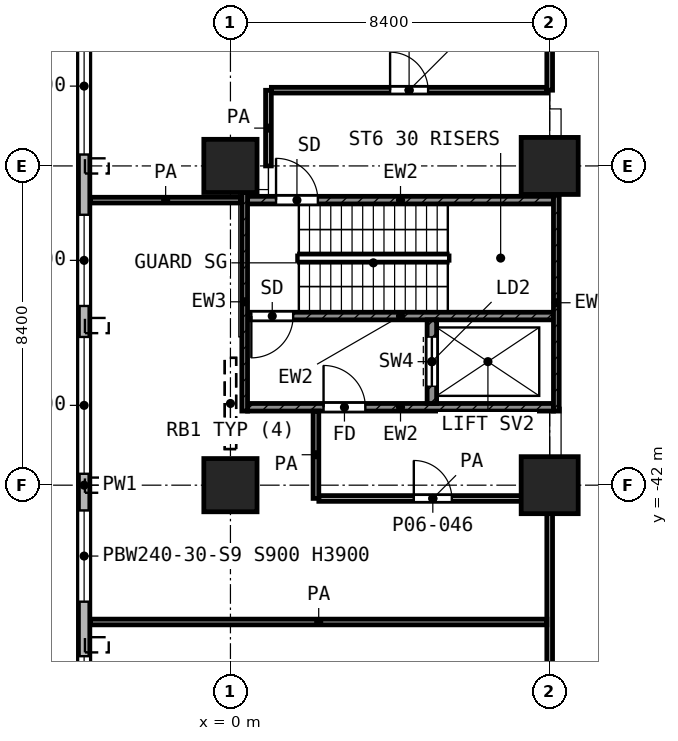
"""IFC4 building model, lengths in metres.
Left out: names, types, materials, properties, quantities, classifications, styles, units other than length and angle.
Written with IfcOpenShell. Run it as: python <this file> out.ifc"""

import sys

from ifc_helpers import new_model, si_unit, direction, frame, frame_2d, origin, origin_2d, place, context, subcontext, project, spatial, rectangle, extrude, element, fill, save


model = new_model("IFC4")
c1 = context("Model", 3, precision=1e-05, world=origin(), true_north=direction((0.0, 1.0)))
c2 = subcontext(c1, "Body", "Model", "MODEL_VIEW")
j1 = project(units=[si_unit("LENGTHUNIT", "METRE"), si_unit("PLANEANGLEUNIT", "RADIAN")], contexts=[c1])
p1 = place(None, origin())
s1 = spatial("IfcSite", under=j1, at=p1, CompositionType="ELEMENT")
p2 = place(p1, origin())
s2 = spatial("IfcBuilding", under=s1, at=p2, CompositionType="ELEMENT")
p3 = place(p2, frame((0.0, 0.0, 29.0)))
s3 = spatial("IfcBuildingStorey", under=s2, at=p3, CompositionType="ELEMENT", Elevation=29.0)
p4 = place(p3, frame((0.0, -33.6, 0.0), z_axis=(0.0, 0.0, 1.0), x_axis=(1.0, 0.0, 0.0)))
e1 = element("IfcColumn", 1, at=p4, inside=s3, PredefinedType="COLUMN", context=c2, shape_type="SweptSolid", body=[
    extrude(rectangle(XDim=1.4, YDim=1.4, at=origin_2d()), origin(), (0.0, 0.0, 1.0), 5.2),
])
p5 = place(p3, frame((8.4, -33.6, 0.0), z_axis=(0.0, 0.0, 1.0), x_axis=(1.0, 0.0, 0.0)))
e2 = element("IfcColumn", 2, at=p5, inside=s3, PredefinedType="COLUMN", context=c2, shape_type="SweptSolid", body=[
    extrude(rectangle(XDim=1.5, YDim=1.5, at=origin_2d()), origin(), (0.0, 0.0, 1.0), 5.2),
])
p6 = place(p3, frame((0.0, -42.0, 0.0), z_axis=(0.0, 0.0, 1.0), x_axis=(1.0, 0.0, 0.0)))
e3 = element("IfcColumn", 3, at=p6, inside=s3, PredefinedType="COLUMN", context=c2, shape_type="SweptSolid", body=[
    extrude(rectangle(XDim=1.4, YDim=1.4, at=origin_2d()), origin(), (0.0, 0.0, 1.0), 5.2),
])
p7 = place(p3, frame((8.4, -42.0, 0.0), z_axis=(0.0, 0.0, 1.0), x_axis=(1.0, 0.0, 0.0)))
e4 = element("IfcColumn", 4, at=p7, inside=s3, PredefinedType="COLUMN", context=c2, shape_type="SweptSolid", body=[
    extrude(rectangle(XDim=1.5, YDim=1.5, at=origin_2d()), origin(), (0.0, 0.0, 1.0), 5.2),
])
p8 = place(p3, frame((-3.85, -2.062, 0.0), z_axis=(0.0, 0.0, 1.0), x_axis=(0.0, -1.0, 0.0)))
e5 = element("IfcWall", 5, at=p8, inside=s3, PredefinedType="SOLIDWALL", context=c2, shape_type="SweptSolid", body=[
    extrude(rectangle(XDim=79.876, YDim=0.3, at=frame_2d((39.938, 0.0))), origin(), (0.0, 0.0, 1.0), 4.7),
])
p9 = place(p8, frame((0.438, 0.0, 0.9)))
e6 = element("IfcOpeningElement", 6, at=p9, cuts=e5, PredefinedType="OPENING", context=c2, shape_type="SweptSolid", body=[
    extrude(rectangle(XDim=1.2, YDim=3.0, at=frame_2d((0.6, 1.5))), frame((0.0, 0.16, 0.0), z_axis=(0.0, -1.0, 0.0), x_axis=(1.0, 0.0, 0.0)), (0.0, 0.0, 1.0), 0.32),
])
p10 = place(p8, frame((2.438, 0.0, 0.9)))
e7 = element("IfcOpeningElement", 7, at=p10, cuts=e5, PredefinedType="OPENING", context=c2, shape_type="SweptSolid", body=[
    extrude(rectangle(XDim=3.6, YDim=3.0, at=frame_2d((1.8, 1.5))), frame((0.0, 0.16, 0.0), z_axis=(0.0, -1.0, 0.0), x_axis=(1.0, 0.0, 0.0)), (0.0, 0.0, 1.0), 0.32),
])
p11 = place(p8, frame((6.638, 0.0, 0.9)))
e8 = element("IfcOpeningElement", 8, at=p11, cuts=e5, PredefinedType="OPENING", context=c2, shape_type="SweptSolid", body=[
    extrude(rectangle(XDim=3.6, YDim=3.0, at=frame_2d((1.8, 1.5))), frame((0.0, 0.16, 0.0), z_axis=(0.0, -1.0, 0.0), x_axis=(1.0, 0.0, 0.0)), (0.0, 0.0, 1.0), 0.32),
])
p12 = place(p8, frame((10.838, 0.0, 0.9)))
e9 = element("IfcOpeningElement", 9, at=p12, cuts=e5, PredefinedType="OPENING", context=c2, shape_type="SweptSolid", body=[
    extrude(rectangle(XDim=3.6, YDim=3.0, at=frame_2d((1.8, 1.5))), frame((0.0, 0.16, 0.0), z_axis=(0.0, -1.0, 0.0), x_axis=(1.0, 0.0, 0.0)), (0.0, 0.0, 1.0), 0.32),
])
p13 = place(p8, frame((15.038, 0.0, 0.9)))
e10 = element("IfcOpeningElement", 10, at=p13, cuts=e5, PredefinedType="OPENING", context=c2, shape_type="SweptSolid", body=[
    extrude(rectangle(XDim=3.6, YDim=3.0, at=frame_2d((1.8, 1.5))), frame((0.0, 0.16, 0.0), z_axis=(0.0, -1.0, 0.0), x_axis=(1.0, 0.0, 0.0)), (0.0, 0.0, 1.0), 0.32),
])
p14 = place(p8, frame((19.238, 0.0, 0.9)))
e11 = element("IfcOpeningElement", 11, at=p14, cuts=e5, PredefinedType="OPENING", context=c2, shape_type="SweptSolid", body=[
    extrude(rectangle(XDim=3.6, YDim=3.0, at=frame_2d((1.8, 1.5))), frame((0.0, 0.16, 0.0), z_axis=(0.0, -1.0, 0.0), x_axis=(1.0, 0.0, 0.0)), (0.0, 0.0, 1.0), 0.32),
])
p15 = place(p8, frame((24.323, 0.0, 0.9)))
e12 = element("IfcOpeningElement", 12, at=p15, cuts=e5, PredefinedType="OPENING", context=c2, shape_type="SweptSolid", body=[
    extrude(rectangle(XDim=2.4, YDim=3.0, at=frame_2d((1.2, 1.5))), frame((0.0, 0.16, 0.0), z_axis=(0.0, -1.0, 0.0), x_axis=(1.0, 0.0, 0.0)), (0.0, 0.0, 1.0), 0.32),
])
p16 = place(p8, frame((27.638, 0.0, 0.9)))
e13 = element("IfcOpeningElement", 13, at=p16, cuts=e5, PredefinedType="OPENING", context=c2, shape_type="SweptSolid", body=[
    extrude(rectangle(XDim=3.6, YDim=3.0, at=frame_2d((1.8, 1.5))), frame((0.0, 0.16, 0.0), z_axis=(0.0, -1.0, 0.0), x_axis=(1.0, 0.0, 0.0)), (0.0, 0.0, 1.0), 0.32),
])
p17 = place(p8, frame((32.823, 0.0, 0.9)))
e14 = element("IfcOpeningElement", 14, at=p17, cuts=e5, PredefinedType="OPENING", context=c2, shape_type="SweptSolid", body=[
    extrude(rectangle(XDim=2.4, YDim=3.0, at=frame_2d((1.2, 1.5))), frame((0.0, 0.16, 0.0), z_axis=(0.0, -1.0, 0.0), x_axis=(1.0, 0.0, 0.0)), (0.0, 0.0, 1.0), 0.32),
])
p18 = place(p8, frame((36.038, 0.0, 0.9)))
e15 = element("IfcOpeningElement", 15, at=p18, cuts=e5, PredefinedType="OPENING", context=c2, shape_type="SweptSolid", body=[
    extrude(rectangle(XDim=3.6, YDim=3.0, at=frame_2d((1.8, 1.5))), frame((0.0, 0.16, 0.0), z_axis=(0.0, -1.0, 0.0), x_axis=(1.0, 0.0, 0.0)), (0.0, 0.0, 1.0), 0.32),
])
p19 = place(p8, frame((40.603, 0.0, 0.9)))
e16 = element("IfcOpeningElement", 16, at=p19, cuts=e5, PredefinedType="OPENING", context=c2, shape_type="SweptSolid", body=[
    extrude(rectangle(XDim=2.4, YDim=3.0, at=frame_2d((1.2, 1.5))), frame((0.0, 0.16, 0.0), z_axis=(0.0, -1.0, 0.0), x_axis=(1.0, 0.0, 0.0)), (0.0, 0.0, 1.0), 0.32),
])
p20 = place(p8, frame((44.438, 0.0, 0.9)))
e17 = element("IfcOpeningElement", 17, at=p20, cuts=e5, PredefinedType="OPENING", context=c2, shape_type="SweptSolid", body=[
    extrude(rectangle(XDim=3.6, YDim=3.0, at=frame_2d((1.8, 1.5))), frame((0.0, 0.16, 0.0), z_axis=(0.0, -1.0, 0.0), x_axis=(1.0, 0.0, 0.0)), (0.0, 0.0, 1.0), 0.32),
])
p21 = place(p8, frame((48.638, 0.0, 0.9)))
e18 = element("IfcOpeningElement", 18, at=p21, cuts=e5, PredefinedType="OPENING", context=c2, shape_type="SweptSolid", body=[
    extrude(rectangle(XDim=3.6, YDim=3.0, at=frame_2d((1.8, 1.5))), frame((0.0, 0.16, 0.0), z_axis=(0.0, -1.0, 0.0), x_axis=(1.0, 0.0, 0.0)), (0.0, 0.0, 1.0), 0.32),
])
p22 = place(p8, frame((52.838, 0.0, 0.9)))
e19 = element("IfcOpeningElement", 19, at=p22, cuts=e5, PredefinedType="OPENING", context=c2, shape_type="SweptSolid", body=[
    extrude(rectangle(XDim=3.6, YDim=3.0, at=frame_2d((1.8, 1.5))), frame((0.0, 0.16, 0.0), z_axis=(0.0, -1.0, 0.0), x_axis=(1.0, 0.0, 0.0)), (0.0, 0.0, 1.0), 0.32),
])
p23 = place(p8, frame((57.038, 0.0, 0.9)))
e20 = element("IfcOpeningElement", 20, at=p23, cuts=e5, PredefinedType="OPENING", context=c2, shape_type="SweptSolid", body=[
    extrude(rectangle(XDim=3.6, YDim=3.0, at=frame_2d((1.8, 1.5))), frame((0.0, 0.16, 0.0), z_axis=(0.0, -1.0, 0.0), x_axis=(1.0, 0.0, 0.0)), (0.0, 0.0, 1.0), 0.32),
])
p24 = place(p8, frame((62.073, 0.0, 0.9)))
e21 = element("IfcOpeningElement", 21, at=p24, cuts=e5, PredefinedType="OPENING", context=c2, shape_type="SweptSolid", body=[
    extrude(rectangle(XDim=2.4, YDim=3.0, at=frame_2d((1.2, 1.5))), frame((0.0, 0.16, 0.0), z_axis=(0.0, -1.0, 0.0), x_axis=(1.0, 0.0, 0.0)), (0.0, 0.0, 1.0), 0.32),
])
p25 = place(p8, frame((65.438, 0.0, 0.9)))
e22 = element("IfcOpeningElement", 22, at=p25, cuts=e5, PredefinedType="OPENING", context=c2, shape_type="SweptSolid", body=[
    extrude(rectangle(XDim=3.6, YDim=3.0, at=frame_2d((1.8, 1.5))), frame((0.0, 0.16, 0.0), z_axis=(0.0, -1.0, 0.0), x_axis=(1.0, 0.0, 0.0)), (0.0, 0.0, 1.0), 0.32),
])
p26 = place(p8, frame((70.038, 0.0, 0.9)))
e23 = element("IfcOpeningElement", 23, at=p26, cuts=e5, PredefinedType="OPENING", context=c2, shape_type="SweptSolid", body=[
    extrude(rectangle(XDim=1.2, YDim=3.0, at=frame_2d((0.6, 1.5))), frame((0.0, 0.16, 0.0), z_axis=(0.0, -1.0, 0.0), x_axis=(1.0, 0.0, 0.0)), (0.0, 0.0, 1.0), 0.32),
])
p27 = place(p8, frame((73.838, 0.0, 0.9)))
e24 = element("IfcOpeningElement", 24, at=p27, cuts=e5, PredefinedType="OPENING", context=c2, shape_type="SweptSolid", body=[
    extrude(rectangle(XDim=3.6, YDim=3.0, at=frame_2d((1.8, 1.5))), frame((0.0, 0.16, 0.0), z_axis=(0.0, -1.0, 0.0), x_axis=(1.0, 0.0, 0.0)), (0.0, 0.0, 1.0), 0.32),
])
p28 = place(p8, frame((78.323, 0.0, 0.9)))
e25 = element("IfcOpeningElement", 25, at=p28, cuts=e5, PredefinedType="OPENING", context=c2, shape_type="SweptSolid", body=[
    extrude(rectangle(XDim=1.2, YDim=3.0, at=frame_2d((0.6, 1.5))), frame((0.0, 0.16, 0.0), z_axis=(0.0, -1.0, 0.0), x_axis=(1.0, 0.0, 0.0)), (0.0, 0.0, 1.0), 0.32),
])
p29 = place(p3, frame((0.375, -40.05, 0.0), z_axis=(0.0, 0.0, 1.0), x_axis=(0.0, 1.0, 0.0)))
e26 = element("IfcWall", 26, at=p29, inside=s3, PredefinedType="SHEAR", context=c2, shape_type="SweptSolid", body=[
    extrude(rectangle(XDim=5.75, YDim=0.15, at=frame_2d((2.875, 0.0))), origin(), (0.0, 0.0, 1.0), 4.7),
])
p30 = place(p3, frame((8.575, -40.05, 0.0), z_axis=(0.0, 0.0, 1.0), x_axis=(0.0, 1.0, 0.0)))
e27 = element("IfcWall", 27, at=p30, inside=s3, PredefinedType="SHEAR", context=c2, shape_type="SweptSolid", body=[
    extrude(rectangle(XDim=5.7, YDim=0.15, at=frame_2d((2.85, 0.0))), origin(), (0.0, 0.0, 1.0), 4.7),
])
p31 = place(p3, frame((0.45, -34.5, 0.0), z_axis=(0.0, 0.0, 1.0), x_axis=(1.0, 0.0, 0.0)))
e28 = element("IfcWall", 28, at=p31, inside=s3, PredefinedType="SHEAR", context=c2, shape_type="SweptSolid", body=[
    extrude(rectangle(XDim=8.05, YDim=0.2, at=frame_2d((4.025, 0.0))), origin(), (0.0, 0.0, 1.0), 4.7),
])
p32 = place(p31, frame((0.75, 0.0, 0.0)))
e29 = element("IfcOpeningElement", 29, at=p32, cuts=e28, PredefinedType="OPENING", context=c2, shape_type="SweptSolid", body=[
    extrude(rectangle(XDim=1.1, YDim=2.1, at=frame_2d((0.55, 1.05))), frame((0.0, 0.11, 0.0), z_axis=(0.0, -1.0, 0.0), x_axis=(1.0, 0.0, 0.0)), (0.0, 0.0, 1.0), 0.22),
])
p33 = place(p3, frame((0.45, -37.55, 0.0), z_axis=(0.0, 0.0, 1.0), x_axis=(1.0, 0.0, 0.0)))
e30 = element("IfcWall", 30, at=p33, inside=s3, PredefinedType="SHEAR", context=c2, shape_type="SweptSolid", body=[
    extrude(rectangle(XDim=8.05, YDim=0.2, at=frame_2d((4.025, 0.0))), origin(), (0.0, 0.0, 1.0), 4.7),
])
p34 = place(p33, frame((0.1, 0.0, 0.0)))
e31 = element("IfcOpeningElement", 31, at=p34, cuts=e30, PredefinedType="OPENING", context=c2, shape_type="SweptSolid", body=[
    extrude(rectangle(XDim=1.1, YDim=2.1, at=frame_2d((0.55, 1.05))), frame((0.0, 0.11, 0.0), z_axis=(0.0, -1.0, 0.0), x_axis=(1.0, 0.0, 0.0)), (0.0, 0.0, 1.0), 0.22),
])
p35 = place(p3, frame((0.45, -39.95, 0.0), z_axis=(0.0, 0.0, 1.0), x_axis=(1.0, 0.0, 0.0)))
e32 = element("IfcWall", 32, at=p35, inside=s3, PredefinedType="SHEAR", context=c2, shape_type="SweptSolid", body=[
    extrude(rectangle(XDim=8.05, YDim=0.2, at=frame_2d((4.025, 0.0))), origin(), (0.0, 0.0, 1.0), 4.7),
])
p36 = place(p35, frame((2.0, 0.0, 0.0)))
e33 = element("IfcOpeningElement", 33, at=p36, cuts=e32, PredefinedType="OPENING", context=c2, shape_type="SweptSolid", body=[
    extrude(rectangle(XDim=1.1, YDim=2.1, at=frame_2d((0.55, 1.05))), frame((0.0, 0.11, 0.0), z_axis=(0.0, -1.0, 0.0), x_axis=(1.0, 0.0, 0.0)), (0.0, 0.0, 1.0), 0.22),
])
p37 = place(p3, frame((5.3, -39.85, 0.0), z_axis=(0.0, 0.0, 1.0), x_axis=(0.0, 1.0, 0.0)))
e34 = element("IfcWall", 34, at=p37, inside=s3, PredefinedType="SHEAR", context=c2, shape_type="SweptSolid", body=[
    extrude(rectangle(XDim=2.2, YDim=0.25, at=frame_2d((1.1, 0.0))), origin(), (0.0, 0.0, 1.0), 4.7),
])
p38 = place(p37, frame((0.45, 0.0, 0.0)))
e35 = element("IfcOpeningElement", 35, at=p38, cuts=e34, PredefinedType="OPENING", context=c2, shape_type="SweptSolid", body=[
    extrude(rectangle(XDim=1.3, YDim=2.1, at=frame_2d((0.65, 1.05))), frame((0.0, 0.135, 0.0), z_axis=(0.0, -1.0, 0.0), x_axis=(1.0, 0.0, 0.0)), (0.0, 0.0, 1.0), 0.27),
])
p39 = place(p3, frame((-3.68, -45.6, 0.0), z_axis=(0.0, 0.0, 1.0), x_axis=(1.0, 0.0, 0.0)))
e36 = element("IfcWall", 36, at=p39, inside=s3, PredefinedType="PARTITIONING", context=c2, shape_type="SweptSolid", body=[
    extrude(rectangle(XDim=12.005, YDim=0.15, at=frame_2d((6.002, 0.0))), origin(), (0.0, 0.0, 1.0), 4.7),
])
p40 = place(p3, frame((2.326, -42.35, 0.0), z_axis=(0.0, 0.0, 1.0), x_axis=(1.0, 0.0, 0.0)))
e37 = element("IfcWall", 37, at=p40, inside=s3, PredefinedType="PARTITIONING", context=c2, shape_type="SweptSolid", body=[
    extrude(rectangle(XDim=5.999, YDim=0.15, at=frame_2d((3.0, 0.0))), origin(), (0.0, 0.0, 1.0), 4.7),
])
p41 = place(p40, frame((2.499, 0.0, 0.0)))
e38 = element("IfcOpeningElement", 38, at=p41, cuts=e37, PredefinedType="OPENING", context=c2, shape_type="SweptSolid", body=[
    extrude(rectangle(XDim=1.0, YDim=2.1, at=frame_2d((0.5, 1.05))), frame((0.0, 0.085, 0.0), z_axis=(0.0, -1.0, 0.0), x_axis=(1.0, 0.0, 0.0)), (0.0, 0.0, 1.0), 0.17),
])
p42 = place(p3, frame((-3.68, -34.5, 0.0), z_axis=(0.0, 0.0, 1.0), x_axis=(1.0, 0.0, 0.0)))
e39 = element("IfcWall", 39, at=p42, inside=s3, PredefinedType="PARTITIONING", context=c2, shape_type="SweptSolid", body=[
    extrude(rectangle(XDim=3.95, YDim=0.15, at=frame_2d((1.975, 0.0))), origin(), (0.0, 0.0, 1.0), 4.7),
])
p43 = place(p3, frame((1.077, -31.607, 0.0), z_axis=(0.0, 0.0, 1.0), x_axis=(1.0, 0.0, 0.0)))
e40 = element("IfcWall", 40, at=p43, inside=s3, PredefinedType="PARTITIONING", context=c2, shape_type="SweptSolid", body=[
    extrude(rectangle(XDim=7.248, YDim=0.15, at=frame_2d((3.624, 0.0))), origin(), (0.0, 0.0, 1.0), 4.7),
])
p44 = place(p43, frame((3.124, 0.0, 0.0)))
e41 = element("IfcOpeningElement", 41, at=p44, cuts=e40, PredefinedType="OPENING", context=c2, shape_type="SweptSolid", body=[
    extrude(rectangle(XDim=1.0, YDim=2.1, at=frame_2d((0.5, 1.05))), frame((0.0, 0.085, 0.0), z_axis=(0.0, -1.0, 0.0), x_axis=(1.0, 0.0, 0.0)), (0.0, 0.0, 1.0), 0.17),
])
p45 = place(p3, frame((1.0, -33.6, 0.0), z_axis=(0.0, 0.0, 1.0), x_axis=(0.0, 1.0, 0.0)))
e42 = element("IfcWall", 42, at=p45, inside=s3, PredefinedType="PARTITIONING", context=c2, shape_type="SweptSolid", body=[
    extrude(rectangle(XDim=1.99, YDim=0.15, at=frame_2d((0.995, 0.0))), origin(), (0.0, 0.0, 1.0), 4.7),
])
p46 = place(p3, frame((2.25, -42.348, 0.0), z_axis=(0.0, 0.0, 1.0), x_axis=(0.0, 1.0, 0.0)))
e43 = element("IfcWall", 43, at=p46, inside=s3, PredefinedType="PARTITIONING", context=c2, shape_type="SweptSolid", body=[
    extrude(rectangle(XDim=2.298, YDim=0.15, at=frame_2d((1.149, 0.0))), origin(), (0.0, 0.0, 1.0), 4.7),
])
p47 = place(p3, frame((8.4, -67.947, 0.0), z_axis=(0.0, 0.0, 1.0), x_axis=(0.0, 1.0, 0.0)))
e44 = element("IfcWall", 44, at=p47, inside=s3, PredefinedType="PARTITIONING", context=c2, shape_type="SweptSolid", body=[
    extrude(rectangle(XDim=25.597, YDim=0.15, at=frame_2d((12.798, 0.0))), origin(), (0.0, 0.0, 1.0), 4.7),
])
p48 = place(p47, frame((19.447, 0.0, 0.0)))
e45 = element("IfcOpeningElement", 45, at=p48, cuts=e44, PredefinedType="OPENING", context=c2, shape_type="SweptSolid", body=[
    extrude(rectangle(XDim=1.0, YDim=2.1, at=frame_2d((0.5, 1.05))), frame((0.0, 0.085, 0.0), z_axis=(0.0, -1.0, 0.0), x_axis=(1.0, 0.0, 0.0)), (0.0, 0.0, 1.0), 0.17),
])
p49 = place(p47, frame((14.947, 0.0, 0.0)))
e46 = element("IfcOpeningElement", 46, at=p49, cuts=e44, PredefinedType="OPENING", context=c2, shape_type="SweptSolid", body=[
    extrude(rectangle(XDim=1.0, YDim=2.1, at=frame_2d((0.5, 1.05))), frame((0.0, 0.085, 0.0), z_axis=(0.0, -1.0, 0.0), x_axis=(1.0, 0.0, 0.0)), (0.0, 0.0, 1.0), 0.17),
])
p50 = place(p47, frame((10.747, 0.0, 0.0)))
e47 = element("IfcOpeningElement", 47, at=p50, cuts=e44, PredefinedType="OPENING", context=c2, shape_type="SweptSolid", body=[
    extrude(rectangle(XDim=1.0, YDim=2.1, at=frame_2d((0.5, 1.05))), frame((0.0, 0.085, 0.0), z_axis=(0.0, -1.0, 0.0), x_axis=(1.0, 0.0, 0.0)), (0.0, 0.0, 1.0), 0.17),
])
p51 = place(p47, frame((6.247, 0.0, 0.0)))
e48 = element("IfcOpeningElement", 48, at=p51, cuts=e44, PredefinedType="OPENING", context=c2, shape_type="SweptSolid", body=[
    extrude(rectangle(XDim=1.0, YDim=2.1, at=frame_2d((0.5, 1.05))), frame((0.0, 0.085, 0.0), z_axis=(0.0, -1.0, 0.0), x_axis=(1.0, 0.0, 0.0)), (0.0, 0.0, 1.0), 0.17),
])
p52 = place(p47, frame((1.674, 0.0, 0.0)))
e49 = element("IfcOpeningElement", 49, at=p52, cuts=e44, PredefinedType="OPENING", context=c2, shape_type="SweptSolid", body=[
    extrude(rectangle(XDim=1.0, YDim=2.1, at=frame_2d((0.5, 1.05))), frame((0.0, 0.085, 0.0), z_axis=(0.0, -1.0, 0.0), x_axis=(1.0, 0.0, 0.0)), (0.0, 0.0, 1.0), 0.17),
])
p53 = place(p3, frame((8.4, -31.607, 0.0), z_axis=(0.0, 0.0, 1.0), x_axis=(0.0, 1.0, 0.0)))
e50 = element("IfcWall", 50, at=p53, inside=s3, PredefinedType="PARTITIONING", context=c2, shape_type="SweptSolid", body=[
    extrude(rectangle(XDim=6.407, YDim=0.15, at=frame_2d((3.204, 0.0))), origin(), (0.0, 0.0, 1.0), 4.7),
])
p54 = place(p53, frame((4.007, 0.0, 0.0)))
e51 = element("IfcOpeningElement", 51, at=p54, cuts=e50, PredefinedType="OPENING", context=c2, shape_type="SweptSolid", body=[
    extrude(rectangle(XDim=0.9, YDim=2.1, at=frame_2d((0.45, 1.05))), frame((0.0, 0.085, 0.0), z_axis=(0.0, -1.0, 0.0), x_axis=(1.0, 0.0, 0.0)), (0.0, 0.0, 1.0), 0.17),
])
p55 = place(p16, origin())
e52 = element("IfcWindow", 52, at=p55, inside=s3, PartitioningType="SINGLE_PANEL", PredefinedType="WINDOW", context=c2, shape_type="SweptSolid", body=[
    extrude(rectangle(XDim=3.6, YDim=3.0, at=frame_2d((1.8, 1.5))), frame((0.0, 0.03, 0.0), z_axis=(0.0, -1.0, 0.0), x_axis=(1.0, 0.0, 0.0)), (0.0, 0.0, 1.0), 0.06),
])
fill(e13, e52)
p56 = place(p17, origin())
e53 = element("IfcWindow", 53, at=p56, inside=s3, PartitioningType="SINGLE_PANEL", PredefinedType="WINDOW", context=c2, shape_type="SweptSolid", body=[
    extrude(rectangle(XDim=2.4, YDim=3.0, at=frame_2d((1.2, 1.5))), frame((0.0, 0.03, 0.0), z_axis=(0.0, -1.0, 0.0), x_axis=(1.0, 0.0, 0.0)), (0.0, 0.0, 1.0), 0.06),
])
fill(e14, e53)
p57 = place(p18, origin())
e54 = element("IfcWindow", 54, at=p57, inside=s3, PartitioningType="SINGLE_PANEL", PredefinedType="WINDOW", context=c2, shape_type="SweptSolid", body=[
    extrude(rectangle(XDim=3.6, YDim=3.0, at=frame_2d((1.8, 1.5))), frame((0.0, 0.03, 0.0), z_axis=(0.0, -1.0, 0.0), x_axis=(1.0, 0.0, 0.0)), (0.0, 0.0, 1.0), 0.06),
])
fill(e15, e54)
p58 = place(p19, origin())
e55 = element("IfcWindow", 55, at=p58, inside=s3, PartitioningType="SINGLE_PANEL", PredefinedType="WINDOW", context=c2, shape_type="SweptSolid", body=[
    extrude(rectangle(XDim=2.4, YDim=3.0, at=frame_2d((1.2, 1.5))), frame((0.0, 0.03, 0.0), z_axis=(0.0, -1.0, 0.0), x_axis=(1.0, 0.0, 0.0)), (0.0, 0.0, 1.0), 0.06),
])
fill(e16, e55)
p59 = place(p20, origin())
e56 = element("IfcWindow", 56, at=p59, inside=s3, PartitioningType="SINGLE_PANEL", PredefinedType="WINDOW", context=c2, shape_type="SweptSolid", body=[
    extrude(rectangle(XDim=3.6, YDim=3.0, at=frame_2d((1.8, 1.5))), frame((0.0, 0.03, 0.0), z_axis=(0.0, -1.0, 0.0), x_axis=(1.0, 0.0, 0.0)), (0.0, 0.0, 1.0), 0.06),
])
fill(e17, e56)
p60 = place(p32, origin())
e57 = element("IfcDoor", 57, at=p60, inside=s3, OperationType="SINGLE_SWING_LEFT", PredefinedType="DOOR", context=c2, shape_type="SweptSolid", body=[
    extrude(rectangle(XDim=1.1, YDim=2.1, at=frame_2d((0.55, 1.05))), frame((0.0, 0.025, 0.0), z_axis=(0.0, -1.0, 0.0), x_axis=(1.0, 0.0, 0.0)), (0.0, 0.0, 1.0), 0.05),
])
fill(e29, e57)
p61 = place(p34, frame((1.1, 0.0, 0.0), z_axis=(0.0, 0.0, 1.0), x_axis=(-1.0, 0.0, 0.0)))
e58 = element("IfcDoor", 58, at=p61, inside=s3, OperationType="SINGLE_SWING_LEFT", PredefinedType="DOOR", context=c2, shape_type="SweptSolid", body=[
    extrude(rectangle(XDim=1.1, YDim=2.1, at=frame_2d((0.55, 1.05))), frame((0.0, 0.025, 0.0), z_axis=(0.0, -1.0, 0.0), x_axis=(1.0, 0.0, 0.0)), (0.0, 0.0, 1.0), 0.05),
])
fill(e31, e58)
p62 = place(p38, origin())
e59 = element("IfcDoor", 59, at=p62, inside=s3, OperationType="DOUBLE_DOOR_SLIDING", PredefinedType="DOOR", context=c2, shape_type="SweptSolid", body=[
    extrude(rectangle(XDim=1.3, YDim=2.1, at=frame_2d((0.65, 1.05))), frame((0.0, 0.025, 0.0), z_axis=(0.0, -1.0, 0.0), x_axis=(1.0, 0.0, 0.0)), (0.0, 0.0, 1.0), 0.05),
])
fill(e35, e59)
p63 = place(p36, origin())
e60 = element("IfcDoor", 60, at=p63, inside=s3, OperationType="SINGLE_SWING_LEFT", PredefinedType="DOOR", context=c2, shape_type="SweptSolid", body=[
    extrude(rectangle(XDim=1.1, YDim=2.1, at=frame_2d((0.55, 1.05))), frame((0.0, 0.025, 0.0), z_axis=(0.0, -1.0, 0.0), x_axis=(1.0, 0.0, 0.0)), (0.0, 0.0, 1.0), 0.05),
])
fill(e33, e60)
p64 = place(p44, origin())
e61 = element("IfcDoor", 61, at=p64, inside=s3, OperationType="SINGLE_SWING_LEFT", PredefinedType="DOOR", context=c2, shape_type="SweptSolid", body=[
    extrude(rectangle(XDim=1.0, YDim=2.1, at=frame_2d((0.5, 1.05))), frame((0.0, 0.025, 0.0), z_axis=(0.0, -1.0, 0.0), x_axis=(1.0, 0.0, 0.0)), (0.0, 0.0, 1.0), 0.05),
])
fill(e41, e61)
p65 = place(p41, origin())
e62 = element("IfcDoor", 62, at=p65, inside=s3, OperationType="SINGLE_SWING_LEFT", PredefinedType="DOOR", context=c2, shape_type="SweptSolid", body=[
    extrude(rectangle(XDim=1.0, YDim=2.1, at=frame_2d((0.5, 1.05))), frame((0.0, 0.025, 0.0), z_axis=(0.0, -1.0, 0.0), x_axis=(1.0, 0.0, 0.0)), (0.0, 0.0, 1.0), 0.05),
])
fill(e38, e62)
save(model, sys.argv[1])
